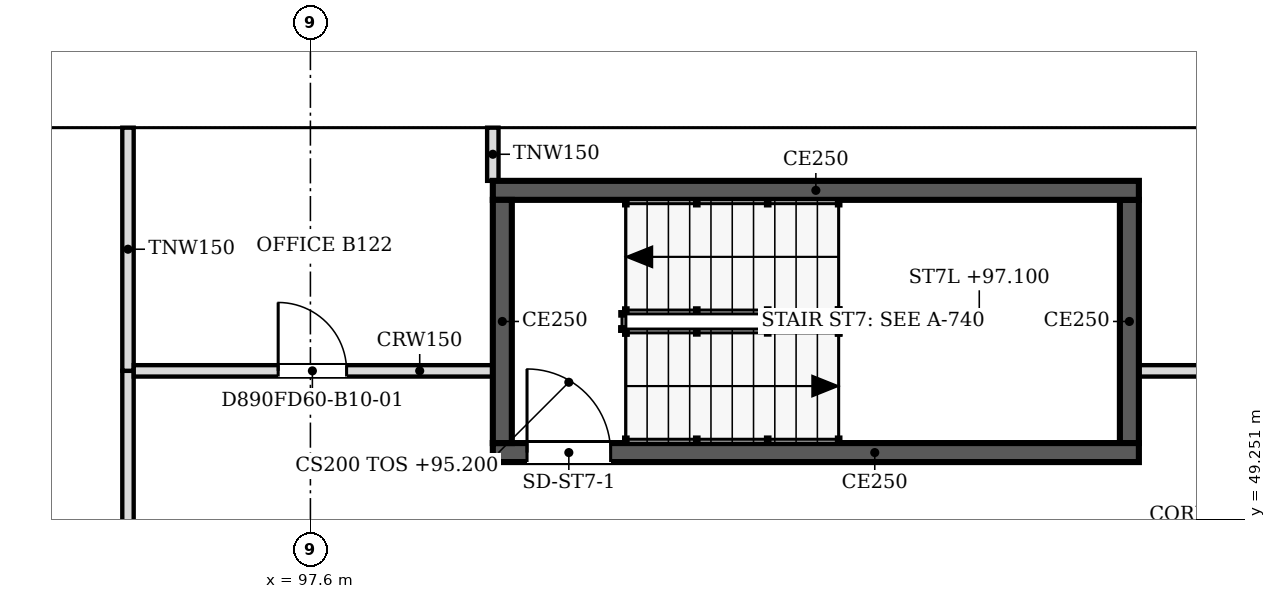
"""IFC4 building model, lengths in metres.
Left out: names, types, materials, properties, quantities, classifications, styles, units other than length and angle.
Written with IfcOpenShell. Run it as: python <this file> out.ifc"""

import sys

from ifc_helpers import new_model, si_unit, direction, frame, frame_2d, origin, place, context, subcontext, project, spatial, polyline, rectangle, outline, extrude, faceted_brep, source, transform, mapped, element, fill, save


model = new_model("IFC4")
c1 = context("Model", 3, precision=1e-05, world=origin(), true_north=direction((0.0, 1.0)))
c2 = subcontext(c1, "Body", "Model", "MODEL_VIEW")
j1 = project(units=[si_unit("LENGTHUNIT", "METRE"), si_unit("PLANEANGLEUNIT", "RADIAN")], contexts=[c1])
p1 = place(None, origin())
s1 = spatial("IfcSite", under=j1, at=p1, CompositionType="ELEMENT")
p2 = place(p1, origin())
s2 = spatial("IfcBuilding", under=s1, at=p2, CompositionType="ELEMENT")
p3 = place(p2, frame((0.0, 0.0, 95.2)))
s3 = spatial("IfcBuildingStorey", under=s2, at=p3, CompositionType="ELEMENT", Elevation=95.2)
m1 = source(origin(), c2, "Body", "SweptSolid", [
    extrude(outline(polyline([(6.1, 0.0), (3.05, 3.8), (0.0, 0.0), (6.1, 0.0)])), frame((0.0, 0.25, 0.0), z_axis=(0.0, -1.0, 0.0), x_axis=(1.0, 0.0, 0.0)), (0.0, 0.0, 1.0), 0.5),
])
p4 = place(p3, frame((112.85, 54.65, 0.0), z_axis=(0.0, 0.0, 1.0), x_axis=(-1.0, 0.0, 0.0)))
e1 = element("IfcWall", 1, at=p4, inside=s3, PredefinedType="SOLIDWALL", context=c2, shape_type="MappedRepresentation", body=[
    mapped(m1, transform((0.0, 0.0, 0.0), scale=1.0)),
])
m2 = source(origin(), c2, "Body", "SweptSolid", [
    extrude(outline(polyline([(5.579, 0.25), (3.05, 3.401), (0.521, 0.25), (5.579, 0.25)])), frame((0.0, 0.26, 0.0), z_axis=(0.0, -1.0, 0.0), x_axis=(1.0, 0.0, 0.0)), (0.0, 0.0, 1.0), 0.52),
])
p5 = place(p4, origin())
e2 = element("IfcOpeningElement", 2, at=p5, cuts=e1, PredefinedType="OPENING", context=c2, shape_type="MappedRepresentation", body=[
    mapped(m2, transform((0.0, 0.0, 0.0), scale=1.0)),
])
p6 = place(p3, frame((106.75, 54.65, 0.0), z_axis=(0.0, 0.0, 1.0), x_axis=(-1.0, 0.0, 0.0)))
e3 = element("IfcWall", 3, at=p6, inside=s3, PredefinedType="SOLIDWALL", context=c2, shape_type="MappedRepresentation", body=[
    mapped(m1, transform((0.0, 0.0, 0.0), scale=1.0)),
])
p7 = place(p6, origin())
e4 = element("IfcOpeningElement", 4, at=p7, cuts=e3, PredefinedType="OPENING", context=c2, shape_type="MappedRepresentation", body=[
    mapped(m2, transform((0.0, 0.0, 0.0), scale=1.0)),
])
m3 = source(origin(), c2, "Body", "Brep", [
    faceted_brep([(6.1, -0.25, 0.0), (3.05, -0.25, 3.8), (0.0, -0.25, 0.0), (6.1, -0.25, 0.0), (0.0, 0.25, 0.0), (3.05, 0.25, 3.8), (6.1, 0.25, 0.0), (6.1, 0.25, 0.0)], [[[0, 1, 2, 3]], [[4, 5, 6, 7]], [[6, 5, 1, 0]], [[5, 4, 2, 1]], [[4, 7, 3, 2]], [[3, 7, 6, 0]]]),
])
p8 = place(p3, frame((100.65, 54.65, 0.0), z_axis=(0.0, 0.0, 1.0), x_axis=(-1.0, 0.0, 0.0)))
e5 = element("IfcWall", 5, at=p8, inside=s3, PredefinedType="SOLIDWALL", context=c2, shape_type="MappedRepresentation", body=[
    mapped(m3, transform((0.0, 0.0, 0.0), scale=1.0)),
])
p9 = place(p8, origin())
e6 = element("IfcOpeningElement", 6, at=p9, cuts=e5, PredefinedType="OPENING", context=c2, shape_type="MappedRepresentation", body=[
    mapped(m2, transform((0.0, 0.0, 0.0), scale=1.0)),
])
m4 = source(origin(), c2, "Body", "Brep", [
    faceted_brep([(3.05, -0.25, 3.74), (3.003, -0.25, 3.8), (0.0, -0.25, 0.0), (3.05, -0.25, 0.0), (0.0, 0.25, 0.0), (2.957, 0.25, 3.741), (2.957, 0.25, 0.0), (3.003, 0.0, 3.8)], [[[0, 1, 2, 3]], [[4, 5, 6]], [[7, 1, 0]], [[5, 4, 2, 1, 7]], [[4, 6, 3, 2]], [[3, 6, 5, 7, 0]]]),
])
p10 = place(p3, frame((94.55, 54.65, 0.0), z_axis=(0.0, 0.0, 1.0), x_axis=(-1.0, 0.0, 0.0)))
e7 = element("IfcWall", 7, at=p10, inside=s3, PredefinedType="SOLIDWALL", context=c2, shape_type="MappedRepresentation", body=[
    mapped(m4, transform((0.0, 0.0, 0.0), scale=1.0)),
])
m5 = source(origin(), c2, "Body", "SweptSolid", [
    extrude(outline(polyline([(2.803, 3.144), (0.516, 0.25), (2.803, 0.25), (2.803, 3.144)])), frame((0.0, 0.26, 0.0), z_axis=(0.0, -1.0, 0.0), x_axis=(1.0, 0.0, 0.0)), (0.0, 0.0, 1.0), 0.52),
])
p11 = place(p10, origin())
e8 = element("IfcOpeningElement", 8, at=p11, cuts=e7, PredefinedType="OPENING", context=c2, shape_type="MappedRepresentation", body=[
    mapped(m5, transform((0.0, 0.0, 0.0), scale=1.0)),
])
p12 = place(p2, frame((0.0, 0.0, 99.0)))
s4 = spatial("IfcBuildingStorey", under=s2, at=p12, CompositionType="ELEMENT", Elevation=99.0)
m6 = source(origin(), c2, "Body", "SweptSolid", [
    extrude(outline(polyline([(3.05, 0.0), (6.1, 3.8), (3.05, 7.6), (0.0, 3.8), (3.05, 0.0)])), frame((0.0, 0.25, 0.0), z_axis=(0.0, -1.0, 0.0), x_axis=(1.0, 0.0, 0.0)), (0.0, 0.0, 1.0), 0.5),
])
p13 = place(p12, frame((109.8, 54.65, -3.8), z_axis=(0.0, 0.0, 1.0), x_axis=(-1.0, 0.0, 0.0)))
e9 = element("IfcWall", 9, at=p13, inside=s4, PredefinedType="SOLIDWALL", context=c2, shape_type="MappedRepresentation", body=[
    mapped(m6, transform((0.0, 0.0, 0.0), scale=1.0)),
])
m7 = source(origin(), c2, "Body", "SweptSolid", [
    extrude(outline(polyline([(3.05, 0.399), (5.78, 3.8), (3.05, 7.201), (0.321, 3.8), (3.05, 0.399)])), frame((0.0, 0.26, 0.0), z_axis=(0.0, -1.0, 0.0), x_axis=(1.0, 0.0, 0.0)), (0.0, 0.0, 1.0), 0.52),
])
p14 = place(p13, origin())
e10 = element("IfcOpeningElement", 10, at=p14, cuts=e9, PredefinedType="OPENING", context=c2, shape_type="MappedRepresentation", body=[
    mapped(m7, transform((0.0, 0.0, 0.0), scale=1.0)),
])
m8 = source(origin(), c2, "Body", "Brep", [
    faceted_brep([(3.05, -0.25, 0.0), (6.1, -0.25, 3.8), (6.1, -0.25, 3.8), (3.05, -0.25, 7.6), (0.0, -0.25, 3.8), (0.0, 0.25, 3.8), (3.05, 0.25, 7.6), (6.1, 0.25, 3.8), (6.1, 0.25, 3.8), (3.05, 0.25, 0.0)], [[[0, 1, 2, 3, 4]], [[5, 6, 7, 8, 9]], [[9, 8, 1, 0]], [[7, 6, 3, 2]], [[6, 5, 4, 3]], [[5, 9, 0, 4]], [[1, 8, 7, 2]]]),
])
p15 = place(p12, frame((103.7, 54.65, -3.8), z_axis=(0.0, 0.0, 1.0), x_axis=(-1.0, 0.0, 0.0)))
e11 = element("IfcWall", 11, at=p15, inside=s4, PredefinedType="SOLIDWALL", context=c2, shape_type="MappedRepresentation", body=[
    mapped(m8, transform((0.0, 0.0, 0.0), scale=1.0)),
])
p16 = place(p15, origin())
e12 = element("IfcOpeningElement", 12, at=p16, cuts=e11, PredefinedType="OPENING", context=c2, shape_type="MappedRepresentation", body=[
    mapped(m7, transform((0.0, 0.0, 0.0), scale=1.0)),
])
m9 = source(origin(), c2, "Body", "Brep", [
    faceted_brep([(3.05, -0.25, 0.0), (6.053, -0.25, 3.8), (3.05, -0.25, 7.6), (0.0, -0.25, 3.8), (0.0, 0.25, 3.8), (3.05, 0.25, 7.6), (6.007, 0.25, 3.859), (6.007, 0.25, 3.741), (3.05, 0.25, 0.0), (6.053, 0.0, 3.8)], [[[0, 1, 2, 3]], [[4, 5, 6, 7, 8]], [[8, 7, 9, 1, 0]], [[6, 5, 2, 1, 9]], [[5, 4, 3, 2]], [[4, 8, 0, 3]], [[9, 7, 6]]]),
])
p17 = place(p12, frame((97.6, 54.65, -3.8), z_axis=(0.0, 0.0, 1.0), x_axis=(-1.0, 0.0, 0.0)))
e13 = element("IfcWall", 13, at=p17, inside=s4, PredefinedType="SOLIDWALL", context=c2, shape_type="MappedRepresentation", body=[
    mapped(m9, transform((0.0, 0.0, 0.0), scale=1.0)),
])
m10 = source(origin(), c2, "Body", "SweptSolid", [
    extrude(outline(polyline([(3.049, 0.401), (5.735, 3.8), (3.049, 7.199), (0.321, 3.8), (3.049, 0.401)])), frame((0.0, 0.26, 0.0), z_axis=(0.0, -1.0, 0.0), x_axis=(1.0, 0.0, 0.0)), (0.0, 0.0, 1.0), 0.52),
])
p18 = place(p17, origin())
e14 = element("IfcOpeningElement", 14, at=p18, cuts=e13, PredefinedType="OPENING", context=c2, shape_type="MappedRepresentation", body=[
    mapped(m10, transform((0.0, 0.0, 0.0), scale=1.0)),
])
p19 = place(p3, frame((108.5, 50.125, 0.0), z_axis=(0.0, 0.0, 1.0), x_axis=(-1.0, 0.0, 0.0)))
e15 = element("IfcWall", 15, at=p19, inside=s3, PredefinedType="SOLIDWALL", context=c2, shape_type="SweptSolid", body=[
    extrude(rectangle(XDim=8.5, YDim=0.25, at=frame_2d((4.25, 0.0))), origin(), (0.0, 0.0, 1.0), 3.8),
])
m11 = source(origin(), c2, "Body", "SweptSolid", [
    extrude(rectangle(XDim=1.1, YDim=2.1, at=frame_2d((0.55, 1.05))), frame((0.0, 0.135, 0.0), z_axis=(0.0, -1.0, 0.0), x_axis=(1.0, 0.0, 0.0)), (0.0, 0.0, 1.0), 0.27),
])
p20 = place(p19, frame((6.95, 0.0, 0.0)))
e16 = element("IfcOpeningElement", 16, at=p20, cuts=e15, PredefinedType="OPENING", context=c2, shape_type="MappedRepresentation", body=[
    mapped(m11, transform((0.0, 0.0, 0.0), scale=1.0)),
])
p21 = place(p3, frame((100.125, 50.25, 0.0), z_axis=(0.0, 0.0, 1.0), x_axis=(0.0, 1.0, 0.0)))
e17 = element("IfcWall", 17, at=p21, inside=s3, PredefinedType="SOLIDWALL", context=c2, shape_type="SweptSolid", body=[
    extrude(rectangle(XDim=3.2, YDim=0.25, at=frame_2d((1.6, 0.0))), origin(), (0.0, 0.0, 1.0), 3.8),
])
p22 = place(p3, frame((100.0, 53.575, 0.0), z_axis=(0.0, 0.0, 1.0), x_axis=(1.0, 0.0, 0.0)))
e18 = element("IfcWall", 18, at=p22, inside=s3, PredefinedType="SOLIDWALL", context=c2, shape_type="SweptSolid", body=[
    extrude(rectangle(XDim=8.5, YDim=0.25, at=frame_2d((4.25, 0.0))), origin(), (0.0, 0.0, 1.0), 3.8),
])
p23 = place(p3, frame((108.375, 53.45, 0.0), z_axis=(0.0, 0.0, 1.0), x_axis=(0.0, -1.0, 0.0)))
e19 = element("IfcWall", 19, at=p23, inside=s3, PredefinedType="SOLIDWALL", context=c2, shape_type="SweptSolid", body=[
    extrude(rectangle(XDim=3.2, YDim=0.25, at=frame_2d((1.6, 0.0))), origin(), (0.0, 0.0, 1.0), 3.8),
])
p24 = place(p3, frame((95.2, 36.6, 0.0), z_axis=(0.0, 0.0, 1.0), x_axis=(0.0, 1.0, 0.0)))
e20 = element("IfcWall", 20, at=p24, inside=s3, PredefinedType="PARTITIONING", context=c2, shape_type="SweptSolid", body=[
    extrude(rectangle(XDim=14.6, YDim=0.15, at=frame_2d((7.3, 0.0))), origin(), (0.0, 0.0, 1.0), 3.067),
])
m12 = source(origin(), c2, "Body", "SweptSolid", [
    extrude(rectangle(XDim=1.0, YDim=2.1, at=frame_2d((0.5, 1.05))), frame((0.0, 0.085, 0.0), z_axis=(0.0, -1.0, 0.0), x_axis=(1.0, 0.0, 0.0)), (0.0, 0.0, 1.0), 0.17),
])
p25 = place(p24, frame((11.301, 0.0, 0.0)))
e21 = element("IfcOpeningElement", 21, at=p25, cuts=e20, PredefinedType="OPENING", context=c2, shape_type="MappedRepresentation", body=[
    mapped(m12, transform((0.0, 0.0, 0.0), scale=1.0)),
])
p26 = place(p24, frame((4.0, 0.0, 0.0)))
e22 = element("IfcOpeningElement", 22, at=p26, cuts=e20, PredefinedType="OPENING", context=c2, shape_type="MappedRepresentation", body=[
    mapped(m12, transform((0.0, 0.0, 0.0), scale=1.0)),
])
p27 = place(p3, frame((95.2, 51.201, 0.0), z_axis=(0.0, 0.0, 1.0), x_axis=(0.0, 1.0, 0.0)))
e23 = element("IfcWall", 23, at=p27, inside=s3, PredefinedType="PARTITIONING", context=c2, shape_type="SweptSolid", body=[
    extrude(rectangle(XDim=3.199, YDim=0.15, at=frame_2d((1.6, 0.0))), origin(), (0.0, 0.0, 1.0), 3.067),
])
p28 = place(p3, frame((95.276, 51.2, 0.0), z_axis=(0.0, 0.0, 1.0), x_axis=(1.0, 0.0, 0.0)))
e24 = element("IfcWall", 24, at=p28, inside=s3, PredefinedType="PARTITIONING", context=c2, shape_type="SweptSolid", body=[
    extrude(rectangle(XDim=4.724, YDim=0.15, at=frame_2d((2.362, 0.0))), origin(), (0.0, 0.0, 1.0), 3.067),
])
m13 = source(origin(), c2, "Body", "SweptSolid", [
    extrude(rectangle(XDim=0.9, YDim=2.1, at=frame_2d((0.45, 1.05))), frame((0.0, 0.085, 0.0), z_axis=(0.0, -1.0, 0.0), x_axis=(1.0, 0.0, 0.0)), (0.0, 0.0, 1.0), 0.17),
])
p29 = place(p28, frame((1.9, 0.0, 0.0)))
e25 = element("IfcOpeningElement", 25, at=p29, cuts=e24, PredefinedType="OPENING", context=c2, shape_type="MappedRepresentation", body=[
    mapped(m13, transform((0.0, 0.0, 0.0), scale=1.0)),
])
p30 = place(p3, frame((108.5, 51.2, 0.0), z_axis=(0.0, 0.0, 1.0), x_axis=(1.0, 0.0, 0.0)))
e26 = element("IfcWall", 26, at=p30, inside=s3, PredefinedType="PARTITIONING", context=c2, shape_type="SweptSolid", body=[
    extrude(rectangle(XDim=13.5, YDim=0.15, at=frame_2d((6.75, 0.0))), origin(), (0.0, 0.0, 1.0), 3.067),
])
p31 = place(p3, frame((100.0, 53.7, 0.0), z_axis=(0.0, 0.0, 1.0), x_axis=(0.0, 1.0, 0.0)))
e27 = element("IfcWall", 27, at=p31, inside=s3, PredefinedType="PARTITIONING", context=c2, shape_type="SweptSolid", body=[
    extrude(rectangle(XDim=0.7, YDim=0.15, at=frame_2d((0.35, 0.0))), origin(), (0.0, 0.0, 1.0), 3.067),
])
m14 = source(origin(), c2, "Body", "SweptSolid", [
    extrude(rectangle(XDim=1.1, YDim=2.1, at=frame_2d((0.55, 1.05))), frame((0.0, 0.025, 0.0), z_axis=(0.0, -1.0, 0.0), x_axis=(1.0, 0.0, 0.0)), (0.0, 0.0, 1.0), 0.05),
])
p32 = place(p20, origin())
e28 = element("IfcDoor", 28, at=p32, inside=s3, OperationType="SINGLE_SWING_RIGHT", PredefinedType="DOOR", context=c2, shape_type="MappedRepresentation", body=[
    mapped(m14, transform((0.0, 0.0, 0.0), scale=1.0)),
])
fill(e16, e28)
m15 = source(origin(), c2, "Body", "SweptSolid", [
    extrude(rectangle(XDim=0.9, YDim=2.1, at=frame_2d((0.45, 1.05))), frame((0.0, 0.025, 0.0), z_axis=(0.0, -1.0, 0.0), x_axis=(1.0, 0.0, 0.0)), (0.0, 0.0, 1.0), 0.05),
])
p33 = place(p29, origin())
e29 = element("IfcDoor", 29, at=p33, inside=s3, OperationType="SINGLE_SWING_LEFT", PredefinedType="DOOR", context=c2, shape_type="MappedRepresentation", body=[
    mapped(m15, transform((0.0, 0.0, 0.0), scale=1.0)),
])
fill(e25, e29)
save(model, sys.argv[1])
